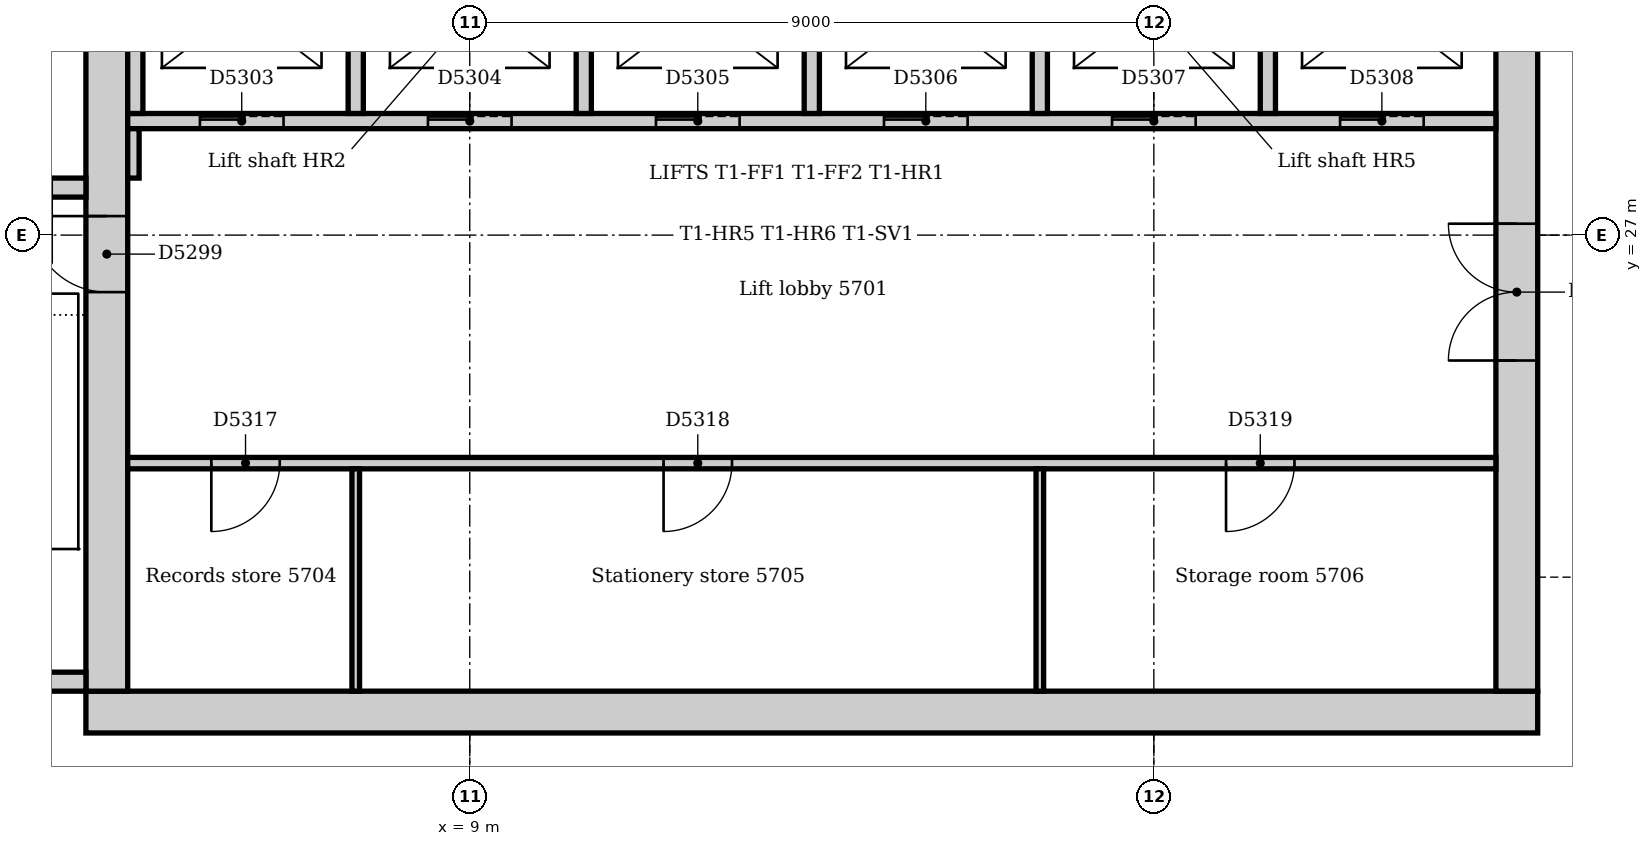
"""IFC4 building model, lengths in metres.
Left out: names, types, materials, properties, quantities, classifications, styles, units other than length and angle.
Written with IfcOpenShell. Run it as: python <this file> out.ifc"""

import sys

from ifc_helpers import new_model, si_unit, direction, frame, frame_2d, origin, place, context, subcontext, project, spatial, rectangle, extrude, element, fill, save


model = new_model("IFC4")
c1 = context("Model", 3, precision=1e-05, world=origin(), true_north=direction((0.0, 1.0)))
c2 = subcontext(c1, "Body", "Model", "MODEL_VIEW")
j1 = project(units=[si_unit("LENGTHUNIT", "METRE"), si_unit("PLANEANGLEUNIT", "RADIAN")], contexts=[c1])
p1 = place(None, origin())
s1 = spatial("IfcSite", under=j1, at=p1, CompositionType="ELEMENT")
p2 = place(p1, origin())
s2 = spatial("IfcBuilding", under=s1, at=p2, CompositionType="ELEMENT")
p3 = place(p2, frame((0.0, 0.0, 238.0)))
s3 = spatial("IfcBuildingStorey", under=s2, at=p3, CompositionType="ELEMENT", Elevation=238.0)
p4 = place(p3, frame((3.95, 20.725, 0.0), z_axis=(0.0, 0.0, 1.0), x_axis=(1.0, 0.0, 0.0)))
e1 = element("IfcWall", 1, at=p4, inside=s3, PredefinedType="SOLIDWALL", context=c2, shape_type="SweptSolid", body=[
    extrude(rectangle(XDim=19.1, YDim=0.55, at=frame_2d((9.55, 0.0))), origin(), (0.0, 0.0, 1.0), 4.0),
])
p5 = place(p3, frame((22.775, 21.0, 0.0), z_axis=(0.0, 0.0, 1.0), x_axis=(0.0, 1.0, 0.0)))
e2 = element("IfcWall", 2, at=p5, inside=s3, PredefinedType="SOLIDWALL", context=c2, shape_type="SweptSolid", body=[
    extrude(rectangle(XDim=10.5, YDim=0.55, at=frame_2d((5.25, 0.0))), origin(), (0.0, 0.0, 1.0), 4.0),
])
p6 = place(p5, frame((4.35, 0.0, 0.0)))
e3 = element("IfcOpeningElement", 3, at=p6, cuts=e2, PredefinedType="OPENING", context=c2, shape_type="SweptSolid", body=[
    extrude(rectangle(XDim=1.8, YDim=2.1, at=frame_2d((0.9, 1.05))), frame((0.0, 0.285, 0.0), z_axis=(0.0, -1.0, 0.0), x_axis=(1.0, 0.0, 0.0)), (0.0, 0.0, 1.0), 0.57),
])
p7 = place(p3, frame((4.225, 31.5, 0.0), z_axis=(0.0, 0.0, 1.0), x_axis=(0.0, -1.0, 0.0)))
e4 = element("IfcWall", 4, at=p7, inside=s3, PredefinedType="SOLIDWALL", context=c2, shape_type="SweptSolid", body=[
    extrude(rectangle(XDim=10.5, YDim=0.55, at=frame_2d((5.25, 0.0))), origin(), (0.0, 0.0, 1.0), 4.0),
])
p8 = place(p7, frame((4.25, 0.0, 0.0)))
e5 = element("IfcOpeningElement", 5, at=p8, cuts=e4, PredefinedType="OPENING", context=c2, shape_type="SweptSolid", body=[
    extrude(rectangle(XDim=1.0, YDim=2.1, at=frame_2d((0.5, 1.05))), frame((0.0, 0.285, 0.0), z_axis=(0.0, -1.0, 0.0), x_axis=(1.0, 0.0, 0.0)), (0.0, 0.0, 1.0), 0.57),
])
p9 = place(p3, frame((0.36, 21.125, 0.0), z_axis=(0.0, 0.0, 1.0), x_axis=(1.0, 0.0, 0.0)))
e6 = element("IfcWall", 6, at=p9, inside=s3, PredefinedType="SOLIDWALL", context=c2, shape_type="SweptSolid", body=[
    extrude(rectangle(XDim=3.59, YDim=0.25, at=frame_2d((1.795, 0.0))), origin(), (0.0, 0.0, 1.0), 4.0),
])
p10 = place(p3, frame((3.95, 27.625, 0.0), z_axis=(0.0, 0.0, 1.0), x_axis=(-1.0, 0.0, 0.0)))
e7 = element("IfcWall", 7, at=p10, inside=s3, PredefinedType="SOLIDWALL", context=c2, shape_type="SweptSolid", body=[
    extrude(rectangle(XDim=3.59, YDim=0.25, at=frame_2d((1.795, 0.0))), origin(), (0.0, 0.0, 1.0), 4.0),
])
p11 = place(p10, frame((0.45, 0.0, 0.0)))
e8 = element("IfcOpeningElement", 8, at=p11, cuts=e7, PredefinedType="OPENING", context=c2, shape_type="SweptSolid", body=[
    extrude(rectangle(XDim=1.0, YDim=2.1, at=frame_2d((0.5, 1.05))), frame((0.0, 0.135, 0.0), z_axis=(0.0, -1.0, 0.0), x_axis=(1.0, 0.0, 0.0)), (0.0, 0.0, 1.0), 0.27),
])
p12 = place(p3, frame((4.5, 28.5, 0.0), z_axis=(0.0, 0.0, 1.0), x_axis=(1.0, 0.0, 0.0)))
e9 = element("IfcWall", 9, at=p12, inside=s3, PredefinedType="PARTITIONING", context=c2, shape_type="SweptSolid", body=[
    extrude(rectangle(XDim=18.0, YDim=0.2, at=frame_2d((9.0, 0.0))), origin(), (0.0, 0.0, 1.0), 3.7),
])
p13 = place(p12, frame((0.95, 0.0, 0.0)))
e10 = element("IfcOpeningElement", 10, at=p13, cuts=e9, PredefinedType="OPENING", context=c2, shape_type="SweptSolid", body=[
    extrude(rectangle(XDim=1.1, YDim=2.1, at=frame_2d((0.55, 1.05))), frame((0.0, 0.11, 0.0), z_axis=(0.0, -1.0, 0.0), x_axis=(1.0, 0.0, 0.0)), (0.0, 0.0, 1.0), 0.22),
])
p14 = place(p12, frame((3.95, 0.0, 0.0)))
e11 = element("IfcOpeningElement", 11, at=p14, cuts=e9, PredefinedType="OPENING", context=c2, shape_type="SweptSolid", body=[
    extrude(rectangle(XDim=1.1, YDim=2.1, at=frame_2d((0.55, 1.05))), frame((0.0, 0.11, 0.0), z_axis=(0.0, -1.0, 0.0), x_axis=(1.0, 0.0, 0.0)), (0.0, 0.0, 1.0), 0.22),
])
p15 = place(p12, frame((6.95, 0.0, 0.0)))
e12 = element("IfcOpeningElement", 12, at=p15, cuts=e9, PredefinedType="OPENING", context=c2, shape_type="SweptSolid", body=[
    extrude(rectangle(XDim=1.1, YDim=2.1, at=frame_2d((0.55, 1.05))), frame((0.0, 0.11, 0.0), z_axis=(0.0, -1.0, 0.0), x_axis=(1.0, 0.0, 0.0)), (0.0, 0.0, 1.0), 0.22),
])
p16 = place(p12, frame((9.95, 0.0, 0.0)))
e13 = element("IfcOpeningElement", 13, at=p16, cuts=e9, PredefinedType="OPENING", context=c2, shape_type="SweptSolid", body=[
    extrude(rectangle(XDim=1.1, YDim=2.1, at=frame_2d((0.55, 1.05))), frame((0.0, 0.11, 0.0), z_axis=(0.0, -1.0, 0.0), x_axis=(1.0, 0.0, 0.0)), (0.0, 0.0, 1.0), 0.22),
])
p17 = place(p12, frame((12.95, 0.0, 0.0)))
e14 = element("IfcOpeningElement", 14, at=p17, cuts=e9, PredefinedType="OPENING", context=c2, shape_type="SweptSolid", body=[
    extrude(rectangle(XDim=1.1, YDim=2.1, at=frame_2d((0.55, 1.05))), frame((0.0, 0.11, 0.0), z_axis=(0.0, -1.0, 0.0), x_axis=(1.0, 0.0, 0.0)), (0.0, 0.0, 1.0), 0.22),
])
p18 = place(p12, frame((15.95, 0.0, 0.0)))
e15 = element("IfcOpeningElement", 15, at=p18, cuts=e9, PredefinedType="OPENING", context=c2, shape_type="SweptSolid", body=[
    extrude(rectangle(XDim=1.1, YDim=2.1, at=frame_2d((0.55, 1.05))), frame((0.0, 0.11, 0.0), z_axis=(0.0, -1.0, 0.0), x_axis=(1.0, 0.0, 0.0)), (0.0, 0.0, 1.0), 0.22),
])
for number, where, z_axis, x_axis in (
    (16, (10.5, 28.6, 0.0), (0.0, 0.0, 1.0), (0.0, 1.0, 0.0)),
    (17, (13.5, 28.6, 0.0), (0.0, 0.0, 1.0), (0.0, 1.0, 0.0)),
    (18, (16.5, 28.6, 0.0), (0.0, 0.0, 1.0), (0.0, 1.0, 0.0)),
    (19, (19.5, 28.6, 0.0), (0.0, 0.0, 1.0), (0.0, 1.0, 0.0)),
    (20, (4.6, 28.6, 0.0), (0.0, 0.0, 1.0), (0.0, 1.0, 0.0)),
    (21, (7.5, 28.6, 0.0), (0.0, 0.0, 1.0), (0.0, 1.0, 0.0)),
):
    element("IfcWall", number, at=place(p3, frame(where, z_axis=z_axis, x_axis=x_axis)), inside=s3, PredefinedType="PARTITIONING", context=c2, shape_type="SweptSolid", body=[
        extrude(rectangle(XDim=2.65, YDim=0.2, at=frame_2d((1.325, 0.0))), origin(), (0.0, 0.0, 1.0), 3.7),
    ])
p19 = place(p3, frame((4.5, 24.0, 0.0), z_axis=(0.0, 0.0, 1.0), x_axis=(1.0, 0.0, 0.0)))
e22 = element("IfcWall", 22, at=p19, inside=s3, PredefinedType="PARTITIONING", context=c2, shape_type="SweptSolid", body=[
    extrude(rectangle(XDim=18.0, YDim=0.15, at=frame_2d((9.0, 0.0))), origin(), (0.0, 0.0, 1.0), 3.7),
])
p20 = place(p19, frame((1.1, 0.0, 0.0)))
e23 = element("IfcOpeningElement", 23, at=p20, cuts=e22, PredefinedType="OPENING", context=c2, shape_type="SweptSolid", body=[
    extrude(rectangle(XDim=0.9, YDim=2.1, at=frame_2d((0.45, 1.05))), frame((0.0, 0.085, 0.0), z_axis=(0.0, -1.0, 0.0), x_axis=(1.0, 0.0, 0.0)), (0.0, 0.0, 1.0), 0.17),
])
p21 = place(p19, frame((7.05, 0.0, 0.0)))
e24 = element("IfcOpeningElement", 24, at=p21, cuts=e22, PredefinedType="OPENING", context=c2, shape_type="SweptSolid", body=[
    extrude(rectangle(XDim=0.9, YDim=2.1, at=frame_2d((0.45, 1.05))), frame((0.0, 0.085, 0.0), z_axis=(0.0, -1.0, 0.0), x_axis=(1.0, 0.0, 0.0)), (0.0, 0.0, 1.0), 0.17),
])
p22 = place(p19, frame((14.45, 0.0, 0.0)))
e25 = element("IfcOpeningElement", 25, at=p22, cuts=e22, PredefinedType="OPENING", context=c2, shape_type="SweptSolid", body=[
    extrude(rectangle(XDim=0.9, YDim=2.1, at=frame_2d((0.45, 1.05))), frame((0.0, 0.085, 0.0), z_axis=(0.0, -1.0, 0.0), x_axis=(1.0, 0.0, 0.0)), (0.0, 0.0, 1.0), 0.17),
])
p23 = place(p3, frame((4.575, 27.75, 0.0), z_axis=(0.0, 0.0, 1.0), x_axis=(0.0, 1.0, 0.0)))
e26 = element("IfcWall", 26, at=p23, inside=s3, PredefinedType="PARTITIONING", context=c2, shape_type="SweptSolid", body=[
    extrude(rectangle(XDim=0.65, YDim=0.15, at=frame_2d((0.325, 0.0))), origin(), (0.0, 0.0, 1.0), 3.7),
])
for number, where, z_axis, x_axis in (
    (27, (7.5, 21.0, 0.0), (0.0, 0.0, 1.0), (0.0, 1.0, 0.0)),
    (28, (16.5, 21.0, 0.0), (0.0, 0.0, 1.0), (0.0, 1.0, 0.0)),
):
    element("IfcWall", number, at=place(p3, frame(where, z_axis=z_axis, x_axis=x_axis)), inside=s3, PredefinedType="PARTITIONING", context=c2, shape_type="SweptSolid", body=[
        extrude(rectangle(XDim=2.925, YDim=0.1, at=frame_2d((1.462, 0.0))), origin(), (0.0, 0.0, 1.0), 3.7),
    ])
p24 = place(p8, frame((1.0, 0.0, 0.0), z_axis=(0.0, 0.0, 1.0), x_axis=(-1.0, 0.0, 0.0)))
e29 = element("IfcDoor", 29, at=p24, inside=s3, OperationType="SINGLE_SWING_RIGHT", PredefinedType="DOOR", context=c2, shape_type="SweptSolid", body=[
    extrude(rectangle(XDim=1.0, YDim=2.1, at=frame_2d((0.5, 1.05))), frame((0.0, 0.025, 0.0), z_axis=(0.0, -1.0, 0.0), x_axis=(1.0, 0.0, 0.0)), (0.0, 0.0, 1.0), 0.05),
])
fill(e5, e29)
p25 = place(p13, origin())
e30 = element("IfcDoor", 30, at=p25, inside=s3, OperationType="SLIDING_TO_LEFT", PredefinedType="DOOR", context=c2, shape_type="SweptSolid", body=[
    extrude(rectangle(XDim=1.1, YDim=2.1, at=frame_2d((0.55, 1.05))), frame((0.0, 0.025, 0.0), z_axis=(0.0, -1.0, 0.0), x_axis=(1.0, 0.0, 0.0)), (0.0, 0.0, 1.0), 0.05),
])
fill(e10, e30)
p26 = place(p14, origin())
e31 = element("IfcDoor", 31, at=p26, inside=s3, OperationType="SLIDING_TO_LEFT", PredefinedType="DOOR", context=c2, shape_type="SweptSolid", body=[
    extrude(rectangle(XDim=1.1, YDim=2.1, at=frame_2d((0.55, 1.05))), frame((0.0, 0.025, 0.0), z_axis=(0.0, -1.0, 0.0), x_axis=(1.0, 0.0, 0.0)), (0.0, 0.0, 1.0), 0.05),
])
fill(e11, e31)
p27 = place(p15, origin())
e32 = element("IfcDoor", 32, at=p27, inside=s3, OperationType="SLIDING_TO_LEFT", PredefinedType="DOOR", context=c2, shape_type="SweptSolid", body=[
    extrude(rectangle(XDim=1.1, YDim=2.1, at=frame_2d((0.55, 1.05))), frame((0.0, 0.025, 0.0), z_axis=(0.0, -1.0, 0.0), x_axis=(1.0, 0.0, 0.0)), (0.0, 0.0, 1.0), 0.05),
])
fill(e12, e32)
p28 = place(p16, origin())
e33 = element("IfcDoor", 33, at=p28, inside=s3, OperationType="SLIDING_TO_LEFT", PredefinedType="DOOR", context=c2, shape_type="SweptSolid", body=[
    extrude(rectangle(XDim=1.1, YDim=2.1, at=frame_2d((0.55, 1.05))), frame((0.0, 0.025, 0.0), z_axis=(0.0, -1.0, 0.0), x_axis=(1.0, 0.0, 0.0)), (0.0, 0.0, 1.0), 0.05),
])
fill(e13, e33)
p29 = place(p17, origin())
e34 = element("IfcDoor", 34, at=p29, inside=s3, OperationType="SLIDING_TO_LEFT", PredefinedType="DOOR", context=c2, shape_type="SweptSolid", body=[
    extrude(rectangle(XDim=1.1, YDim=2.1, at=frame_2d((0.55, 1.05))), frame((0.0, 0.025, 0.0), z_axis=(0.0, -1.0, 0.0), x_axis=(1.0, 0.0, 0.0)), (0.0, 0.0, 1.0), 0.05),
])
fill(e14, e34)
p30 = place(p18, origin())
e35 = element("IfcDoor", 35, at=p30, inside=s3, OperationType="SLIDING_TO_LEFT", PredefinedType="DOOR", context=c2, shape_type="SweptSolid", body=[
    extrude(rectangle(XDim=1.1, YDim=2.1, at=frame_2d((0.55, 1.05))), frame((0.0, 0.025, 0.0), z_axis=(0.0, -1.0, 0.0), x_axis=(1.0, 0.0, 0.0)), (0.0, 0.0, 1.0), 0.05),
])
fill(e15, e35)
p31 = place(p6, origin())
e36 = element("IfcDoor", 36, at=p31, inside=s3, OperationType="DOUBLE_DOOR_DOUBLE_SWING", PredefinedType="DOOR", context=c2, shape_type="SweptSolid", body=[
    extrude(rectangle(XDim=1.8, YDim=2.1, at=frame_2d((0.9, 1.05))), frame((0.0, 0.025, 0.0), z_axis=(0.0, -1.0, 0.0), x_axis=(1.0, 0.0, 0.0)), (0.0, 0.0, 1.0), 0.05),
])
fill(e3, e36)
p32 = place(p20, frame((0.9, 0.0, 0.0), z_axis=(0.0, 0.0, 1.0), x_axis=(-1.0, 0.0, 0.0)))
e37 = element("IfcDoor", 37, at=p32, inside=s3, OperationType="SINGLE_SWING_RIGHT", PredefinedType="DOOR", context=c2, shape_type="SweptSolid", body=[
    extrude(rectangle(XDim=0.9, YDim=2.1, at=frame_2d((0.45, 1.05))), frame((0.0, 0.025, 0.0), z_axis=(0.0, -1.0, 0.0), x_axis=(1.0, 0.0, 0.0)), (0.0, 0.0, 1.0), 0.05),
])
fill(e23, e37)
p33 = place(p21, frame((0.9, 0.0, 0.0), z_axis=(0.0, 0.0, 1.0), x_axis=(-1.0, 0.0, 0.0)))
e38 = element("IfcDoor", 38, at=p33, inside=s3, OperationType="SINGLE_SWING_RIGHT", PredefinedType="DOOR", context=c2, shape_type="SweptSolid", body=[
    extrude(rectangle(XDim=0.9, YDim=2.1, at=frame_2d((0.45, 1.05))), frame((0.0, 0.025, 0.0), z_axis=(0.0, -1.0, 0.0), x_axis=(1.0, 0.0, 0.0)), (0.0, 0.0, 1.0), 0.05),
])
fill(e24, e38)
p34 = place(p22, frame((0.9, 0.0, 0.0), z_axis=(0.0, 0.0, 1.0), x_axis=(-1.0, 0.0, 0.0)))
e39 = element("IfcDoor", 39, at=p34, inside=s3, OperationType="SINGLE_SWING_RIGHT", PredefinedType="DOOR", context=c2, shape_type="SweptSolid", body=[
    extrude(rectangle(XDim=0.9, YDim=2.1, at=frame_2d((0.45, 1.05))), frame((0.0, 0.025, 0.0), z_axis=(0.0, -1.0, 0.0), x_axis=(1.0, 0.0, 0.0)), (0.0, 0.0, 1.0), 0.05),
])
fill(e25, e39)
save(model, sys.argv[1])
